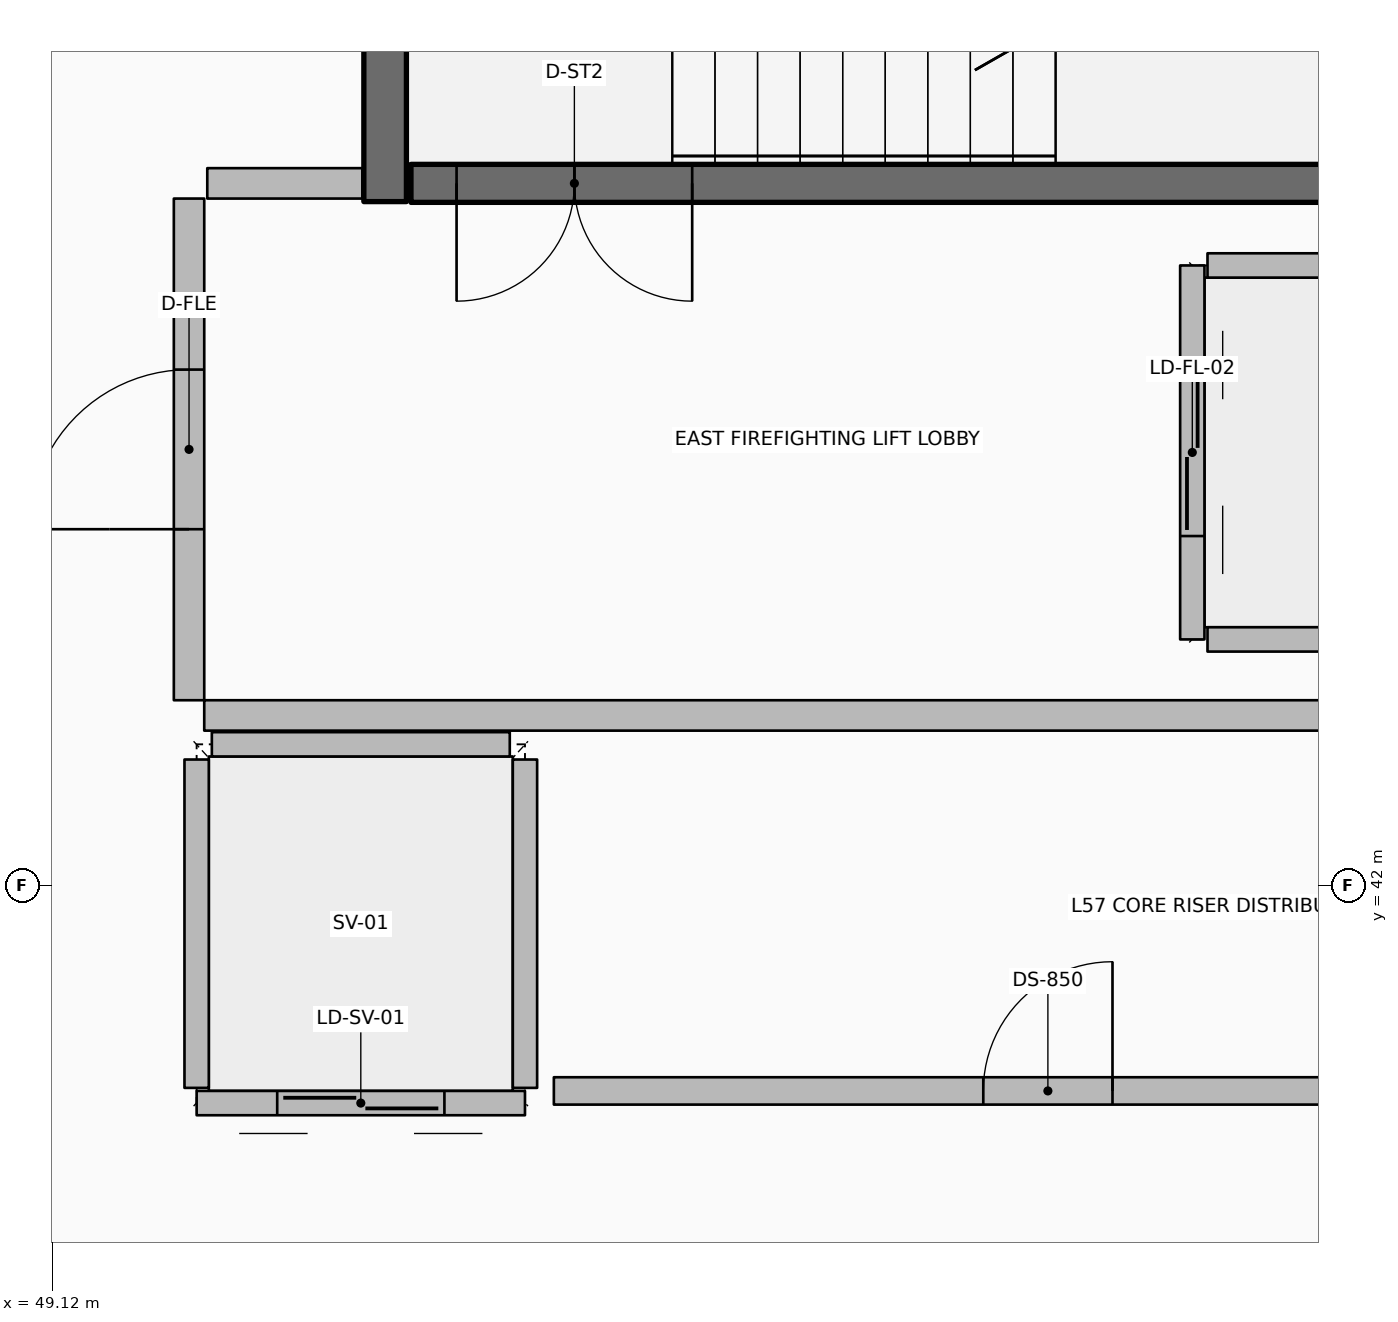
"""IFC4 building model, lengths in metres.
Left out: names, types, materials, properties, quantities, classifications, styles, units other than length and angle.
Written with IfcOpenShell. Run it as: python <this file> out.ifc"""

import sys

from ifc_helpers import new_model, si_unit, direction, frame, frame_2d, origin, origin_2d, place, context, subcontext, project, spatial, rectangle, hollow_rectangle, extrude, element, fill, save


model = new_model("IFC4")
c1 = context("Model", 3, precision=1e-05, world=origin(), true_north=direction((0.0, 1.0)))
c2 = subcontext(c1, "Body", "Model", "MODEL_VIEW")
j1 = project(units=[si_unit("LENGTHUNIT", "METRE"), si_unit("PLANEANGLEUNIT", "RADIAN")], contexts=[c1])
p1 = place(None, origin())
s1 = spatial("IfcSite", under=j1, at=p1, CompositionType="ELEMENT")
p2 = place(p1, origin())
s2 = spatial("IfcBuilding", under=s1, at=p2, CompositionType="ELEMENT")
p3 = place(p2, frame((0.0, 0.0, 225.3)))
s3 = spatial("IfcBuildingStorey", under=s2, at=p3, CompositionType="ELEMENT", Elevation=225.3)
p4 = place(p3, frame((51.31, 46.5, 0.0), z_axis=(0.0, 0.0, 1.0), x_axis=(0.0, 1.0, 0.0)))
e1 = element("IfcWall", 1, at=p4, inside=s3, PredefinedType="SHEAR", context=c2, shape_type="SweptSolid", body=[
    extrude(rectangle(XDim=3.5, YDim=0.28, at=frame_2d((1.75, 0.0))), origin(), (0.0, 0.0, 1.0), 6.6),
])
p5 = place(p3, frame((55.72, 46.62, 0.0), z_axis=(0.0, 0.0, 1.0), x_axis=(1.0, 0.0, 0.0)))
e2 = element("IfcColumn", 2, at=p5, inside=s3, PredefinedType="COLUMN", context=c2, shape_type="SweptSolid", body=[
    extrude(hollow_rectangle(XDim=0.2, YDim=0.2, WallThickness=0.01, InnerFilletRadius=0.01, OuterFilletRadius=0.02, at=origin_2d()), origin(), (0.0, 0.0, 1.0), 1.445),
])
p6 = place(p3, frame((56.42, 46.62, 0.0), z_axis=(0.0, 0.0, 1.0), x_axis=(1.0, 0.0, 0.0)))
e3 = element("IfcColumn", 3, at=p6, inside=s3, PredefinedType="COLUMN", context=c2, shape_type="SweptSolid", body=[
    extrude(hollow_rectangle(XDim=0.2, YDim=0.2, WallThickness=0.01, InnerFilletRadius=0.01, OuterFilletRadius=0.02, at=origin_2d()), origin(), (0.0, 0.0, 1.0), 4.745),
])
p7 = place(p3, frame((51.48, 46.62, 0.0), z_axis=(0.0, 0.0, 1.0), x_axis=(1.0, 0.0, 0.0)))
e4 = element("IfcWall", 4, at=p7, inside=s3, PredefinedType="SOLIDWALL", context=c2, shape_type="SweptSolid", body=[
    extrude(rectangle(XDim=7.54, YDim=0.25, at=frame_2d((3.77, 0.0))), origin(), (0.0, 0.0, 1.0), 6.28),
])
p8 = place(p7, frame((0.3, 0.0, 0.0)))
e5 = element("IfcOpeningElement", 5, at=p8, cuts=e4, PredefinedType="OPENING", context=c2, shape_type="SweptSolid", body=[
    extrude(rectangle(XDim=1.55, YDim=2.15, at=frame_2d((0.775, 1.075))), frame((0.0, 0.135, 0.0), z_axis=(0.0, -1.0, 0.0), x_axis=(1.0, 0.0, 0.0)), (0.0, 0.0, 1.0), 0.27),
])
p9 = place(p3, frame((56.62, 46.08, 0.0), z_axis=(0.0, 0.0, 1.0), x_axis=(0.0, -1.0, 0.0)))
e6 = element("IfcWall", 6, at=p9, inside=s3, PredefinedType="PARTITIONING", context=c2, shape_type="SweptSolid", body=[
    extrude(rectangle(XDim=2.46, YDim=0.16, at=frame_2d((1.23, 0.0))), origin(), (0.0, 0.0, 1.0), 6.28),
])
p10 = place(p9, frame((0.68, 0.0, 0.0)))
e7 = element("IfcOpeningElement", 7, at=p10, cuts=e6, PredefinedType="OPENING", context=c2, shape_type="SweptSolid", body=[
    extrude(rectangle(XDim=1.1, YDim=2.1, at=frame_2d((0.55, 1.05))), frame((0.0, 0.09, 0.0), z_axis=(0.0, -1.0, 0.0), x_axis=(1.0, 0.0, 0.0)), (0.0, 0.0, 1.0), 0.18),
])
for number, where, z_axis, x_axis in (
    (8, (56.72, 46.08, 0.0), (0.0, 0.0, 1.0), (1.0, 0.0, 0.0)),
    (9, (56.72, 43.62, 0.0), (0.0, 0.0, 1.0), (1.0, 0.0, 0.0)),
):
    element("IfcWall", number, at=place(p3, frame(where, z_axis=z_axis, x_axis=x_axis)), inside=s3, PredefinedType="PARTITIONING", context=c2, shape_type="SweptSolid", body=[
        extrude(rectangle(XDim=2.06, YDim=0.16, at=frame_2d((1.03, 0.0))), origin(), (0.0, 0.0, 1.0), 6.28),
    ])
p11 = place(p3, frame((52.23, 40.57, 0.0), z_axis=(0.0, 0.0, 1.0), x_axis=(-1.0, 0.0, 0.0)))
e10 = element("IfcWall", 10, at=p11, inside=s3, PredefinedType="PARTITIONING", context=c2, shape_type="SweptSolid", body=[
    extrude(rectangle(XDim=2.16, YDim=0.16, at=frame_2d((1.08, 0.0))), origin(), (0.0, 0.0, 1.0), 6.28),
])
p12 = place(p11, frame((0.53, 0.0, 0.0)))
e11 = element("IfcOpeningElement", 11, at=p12, cuts=e10, PredefinedType="OPENING", context=c2, shape_type="SweptSolid", body=[
    extrude(rectangle(XDim=1.1, YDim=2.1, at=frame_2d((0.55, 1.05))), frame((0.0, 0.09, 0.0), z_axis=(0.0, -1.0, 0.0), x_axis=(1.0, 0.0, 0.0)), (0.0, 0.0, 1.0), 0.18),
])
for number, where, z_axis, x_axis in (
    (12, (52.23, 40.67, 0.0), (0.0, 0.0, 1.0), (0.0, 1.0, 0.0)),
    (13, (50.07, 40.67, 0.0), (0.0, 0.0, 1.0), (0.0, 1.0, 0.0)),
):
    element("IfcWall", number, at=place(p3, frame(where, z_axis=z_axis, x_axis=x_axis)), inside=s3, PredefinedType="PARTITIONING", context=c2, shape_type="SweptSolid", body=[
        extrude(rectangle(XDim=2.16, YDim=0.16, at=frame_2d((1.08, 0.0))), origin(), (0.0, 0.0, 1.0), 6.28),
    ])
p13 = place(p3, frame((50.17, 42.93, 0.0), z_axis=(0.0, 0.0, 1.0), x_axis=(1.0, 0.0, 0.0)))
e14 = element("IfcWall", 14, at=p13, inside=s3, PredefinedType="PARTITIONING", context=c2, shape_type="SweptSolid", body=[
    extrude(rectangle(XDim=1.96, YDim=0.16, at=frame_2d((0.98, 0.0))), origin(), (0.0, 0.0, 1.0), 6.28),
])
p14 = place(p3, frame((52.42, 40.65, 0.0), z_axis=(0.0, 0.0, 1.0), x_axis=(1.0, 0.0, 0.0)))
e15 = element("IfcWall", 15, at=p14, inside=s3, PredefinedType="PARTITIONING", context=c2, shape_type="SweptSolid", body=[
    extrude(rectangle(XDim=6.5, YDim=0.18, at=frame_2d((3.25, 0.0))), origin(), (0.0, 0.0, 1.0), 6.28),
])
p15 = place(p14, frame((2.825, 0.0, 0.0)))
e16 = element("IfcOpeningElement", 16, at=p15, cuts=e15, PredefinedType="OPENING", context=c2, shape_type="SweptSolid", body=[
    extrude(rectangle(XDim=0.85, YDim=2.06, at=frame_2d((0.425, 1.03))), frame((0.0, 0.1, 0.0), z_axis=(0.0, -1.0, 0.0), x_axis=(1.0, 0.0, 0.0)), (0.0, 0.0, 1.0), 0.2),
])
p16 = place(p3, frame((50.12, 43.12, 0.0), z_axis=(0.0, 0.0, 1.0), x_axis=(1.0, 0.0, 0.0)))
e17 = element("IfcWall", 17, at=p16, inside=s3, PredefinedType="PARTITIONING", context=c2, shape_type="SweptSolid", body=[
    extrude(rectangle(XDim=8.88, YDim=0.2, at=frame_2d((4.44, 0.0))), origin(), (0.0, 0.0, 1.0), 6.28),
])
p17 = place(p3, frame((50.14, 46.62, 0.0), z_axis=(0.0, 0.0, 1.0), x_axis=(1.0, 0.0, 0.0)))
e18 = element("IfcWall", 18, at=p17, inside=s3, PredefinedType="PARTITIONING", context=c2, shape_type="SweptSolid", body=[
    extrude(rectangle(XDim=1.02, YDim=0.2, at=frame_2d((0.51, 0.0))), origin(), (0.0, 0.0, 1.0), 6.28),
])
p18 = place(p3, frame((50.02, 43.22, 0.0), z_axis=(0.0, 0.0, 1.0), x_axis=(0.0, 1.0, 0.0)))
e19 = element("IfcWall", 19, at=p18, inside=s3, PredefinedType="PARTITIONING", context=c2, shape_type="SweptSolid", body=[
    extrude(rectangle(XDim=3.3, YDim=0.2, at=frame_2d((1.65, 0.0))), origin(), (0.0, 0.0, 1.0), 6.28),
])
p19 = place(p18, frame((1.125, 0.0, 0.0)))
e20 = element("IfcOpeningElement", 20, at=p19, cuts=e19, PredefinedType="OPENING", context=c2, shape_type="SweptSolid", body=[
    extrude(rectangle(XDim=1.05, YDim=2.1, at=frame_2d((0.525, 1.05))), frame((0.0, 0.11, 0.0), z_axis=(0.0, -1.0, 0.0), x_axis=(1.0, 0.0, 0.0)), (0.0, 0.0, 1.0), 0.22),
])
p20 = place(p8, origin())
e21 = element("IfcDoor", 21, at=p20, inside=s3, OperationType="DOUBLE_DOOR_SINGLE_SWING", PredefinedType="DOOR", context=c2, shape_type="SweptSolid", body=[
    extrude(rectangle(XDim=1.55, YDim=2.15, at=frame_2d((0.775, 1.075))), frame((0.0, 0.025, 0.0), z_axis=(0.0, -1.0, 0.0), x_axis=(1.0, 0.0, 0.0)), (0.0, 0.0, 1.0), 0.05),
])
fill(e5, e21)
p21 = place(p10, origin())
e22 = element("IfcDoor", 22, at=p21, inside=s3, OperationType="DOUBLE_DOOR_SLIDING", PredefinedType="DOOR", context=c2, shape_type="SweptSolid", body=[
    extrude(rectangle(XDim=1.1, YDim=2.1, at=frame_2d((0.55, 1.05))), frame((0.0, 0.025, 0.0), z_axis=(0.0, -1.0, 0.0), x_axis=(1.0, 0.0, 0.0)), (0.0, 0.0, 1.0), 0.05),
])
fill(e7, e22)
p22 = place(p12, origin())
e23 = element("IfcDoor", 23, at=p22, inside=s3, OperationType="DOUBLE_DOOR_SLIDING", PredefinedType="DOOR", context=c2, shape_type="SweptSolid", body=[
    extrude(rectangle(XDim=1.1, YDim=2.1, at=frame_2d((0.55, 1.05))), frame((0.0, 0.025, 0.0), z_axis=(0.0, -1.0, 0.0), x_axis=(1.0, 0.0, 0.0)), (0.0, 0.0, 1.0), 0.05),
])
fill(e11, e23)
p23 = place(p15, origin())
e24 = element("IfcDoor", 24, at=p23, inside=s3, OperationType="SINGLE_SWING_RIGHT", PredefinedType="DOOR", context=c2, shape_type="SweptSolid", body=[
    extrude(rectangle(XDim=0.85, YDim=2.06, at=frame_2d((0.425, 1.03))), frame((0.0, 0.025, 0.0), z_axis=(0.0, -1.0, 0.0), x_axis=(1.0, 0.0, 0.0)), (0.0, 0.0, 1.0), 0.05),
])
fill(e16, e24)
p24 = place(p19, origin())
e25 = element("IfcDoor", 25, at=p24, inside=s3, OperationType="SINGLE_SWING_LEFT", PredefinedType="DOOR", context=c2, shape_type="SweptSolid", body=[
    extrude(rectangle(XDim=1.05, YDim=2.1, at=frame_2d((0.525, 1.05))), frame((0.0, 0.025, 0.0), z_axis=(0.0, -1.0, 0.0), x_axis=(1.0, 0.0, 0.0)), (0.0, 0.0, 1.0), 0.05),
])
fill(e20, e25)
save(model, sys.argv[1])
